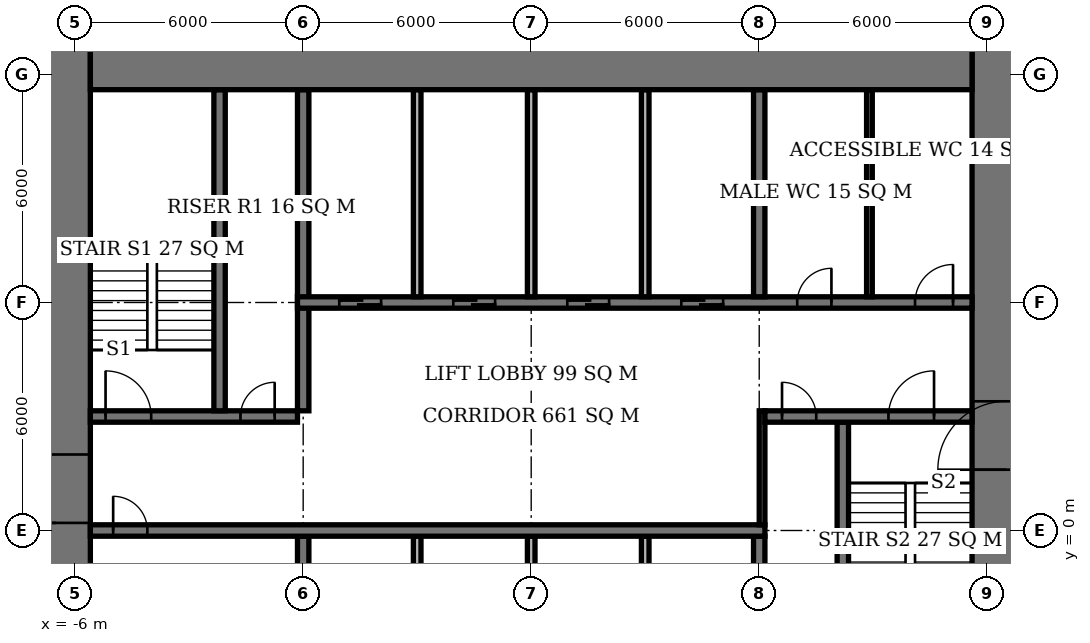
"""IFC4 building model, lengths in metres.
Left out: names, types, materials, properties, quantities, classifications, styles, units other than length and angle.
Written with IfcOpenShell. Run it as: python <this file> out.ifc"""

import sys

from ifc_helpers import new_model, si_unit, direction, frame, frame_2d, origin, place, context, subcontext, project, spatial, rectangle, extrude, element, fill, save


model = new_model("IFC4")
c1 = context("Model", 3, precision=1e-05, world=origin(), true_north=direction((0.0, 1.0)))
c2 = subcontext(c1, "Body", "Model", "MODEL_VIEW")
j1 = project(units=[si_unit("LENGTHUNIT", "METRE"), si_unit("PLANEANGLEUNIT", "RADIAN")], contexts=[c1])
p1 = place(None, origin())
s1 = spatial("IfcSite", under=j1, at=p1, CompositionType="ELEMENT")
p2 = place(p1, origin())
s2 = spatial("IfcBuilding", under=s1, at=p2, CompositionType="ELEMENT")
p3 = place(p2, frame((0.0, 0.0, 65.0)))
s3 = spatial("IfcBuildingStorey", under=s2, at=p3, CompositionType="ELEMENT", Elevation=65.0)
p4 = place(p3, frame((-5.6, 12.6, 0.0), z_axis=(0.0, 0.0, 1.0), x_axis=(1.0, 0.0, 0.0)))
e1 = element("IfcWall", 1, at=p4, inside=s3, PredefinedType="SHEAR", context=c2, shape_type="SweptSolid", body=[
    extrude(rectangle(XDim=23.2, YDim=2.0, at=frame_2d((11.6, 0.0))), origin(), (0.0, 0.0, 1.0), 3.9),
])
p5 = place(p3, frame((-6.5, -7.6, 0.0), z_axis=(0.0, 0.0, 1.0), x_axis=(0.0, 1.0, 0.0)))
e2 = element("IfcWall", 2, at=p5, inside=s3, PredefinedType="SHEAR", context=c2, shape_type="SweptSolid", body=[
    extrude(rectangle(XDim=21.2, YDim=1.8, at=frame_2d((10.6, 0.0))), origin(), (0.0, 0.0, 1.0), 3.9),
])
p6 = place(p5, frame((7.8, 0.0, 0.0)))
e3 = element("IfcOpeningElement", 3, at=p6, cuts=e2, PredefinedType="OPENING", context=c2, shape_type="SweptSolid", body=[
    extrude(rectangle(XDim=1.8, YDim=2.4, at=frame_2d((0.9, 1.2))), frame((0.0, 0.91, 0.0), z_axis=(0.0, -1.0, 0.0), x_axis=(1.0, 0.0, 0.0)), (0.0, 0.0, 1.0), 1.82),
])
p7 = place(p3, frame((18.5, -7.6, 0.0), z_axis=(0.0, 0.0, 1.0), x_axis=(0.0, 1.0, 0.0)))
e4 = element("IfcWall", 4, at=p7, inside=s3, PredefinedType="SHEAR", context=c2, shape_type="SweptSolid", body=[
    extrude(rectangle(XDim=21.2, YDim=1.8, at=frame_2d((10.6, 0.0))), origin(), (0.0, 0.0, 1.0), 3.9),
])
p8 = place(p7, frame((9.2, 0.0, 0.0)))
e5 = element("IfcOpeningElement", 5, at=p8, cuts=e4, PredefinedType="OPENING", context=c2, shape_type="SweptSolid", body=[
    extrude(rectangle(XDim=1.8, YDim=2.4, at=frame_2d((0.9, 1.2))), frame((0.0, 0.91, 0.0), z_axis=(0.0, -1.0, 0.0), x_axis=(1.0, 0.0, 0.0)), (0.0, 0.0, 1.0), 1.82),
])
p9 = place(p3, frame((-5.6, 0.0, 0.0), z_axis=(0.0, 0.0, 1.0), x_axis=(1.0, 0.0, 0.0)))
e6 = element("IfcWall", 6, at=p9, inside=s3, PredefinedType="SHEAR", context=c2, shape_type="SweptSolid", body=[
    extrude(rectangle(XDim=17.75, YDim=0.3, at=frame_2d((8.875, 0.0))), origin(), (0.0, 0.0, 1.0), 3.9),
])
p10 = place(p9, frame((0.6, 0.0, 0.0)))
e7 = element("IfcOpeningElement", 7, at=p10, cuts=e6, PredefinedType="OPENING", context=c2, shape_type="SweptSolid", body=[
    extrude(rectangle(XDim=0.9, YDim=2.1, at=frame_2d((0.45, 1.05))), frame((0.0, 0.16, 0.0), z_axis=(0.0, -1.0, 0.0), x_axis=(1.0, 0.0, 0.0)), (0.0, 0.0, 1.0), 0.32),
])
p11 = place(p3, frame((-5.6, 3.0, 0.0), z_axis=(0.0, 0.0, 1.0), x_axis=(1.0, 0.0, 0.0)))
e8 = element("IfcWall", 8, at=p11, inside=s3, PredefinedType="SHEAR", context=c2, shape_type="SweptSolid", body=[
    extrude(rectangle(XDim=5.45, YDim=0.3, at=frame_2d((2.725, 0.0))), origin(), (0.0, 0.0, 1.0), 3.9),
])
p12 = place(p11, frame((0.4, 0.0, 0.0)))
e9 = element("IfcOpeningElement", 9, at=p12, cuts=e8, PredefinedType="OPENING", context=c2, shape_type="SweptSolid", body=[
    extrude(rectangle(XDim=1.2, YDim=2.1, at=frame_2d((0.6, 1.05))), frame((0.0, 0.16, 0.0), z_axis=(0.0, -1.0, 0.0), x_axis=(1.0, 0.0, 0.0)), (0.0, 0.0, 1.0), 0.32),
])
p13 = place(p11, frame((3.95, 0.0, 0.0)))
e10 = element("IfcOpeningElement", 10, at=p13, cuts=e8, PredefinedType="OPENING", context=c2, shape_type="SweptSolid", body=[
    extrude(rectangle(XDim=0.9, YDim=2.1, at=frame_2d((0.45, 1.05))), frame((0.0, 0.16, 0.0), z_axis=(0.0, -1.0, 0.0), x_axis=(1.0, 0.0, 0.0)), (0.0, 0.0, 1.0), 0.32),
])
p14 = place(p3, frame((12.15, 3.0, 0.0), z_axis=(0.0, 0.0, 1.0), x_axis=(1.0, 0.0, 0.0)))
e11 = element("IfcWall", 11, at=p14, inside=s3, PredefinedType="SHEAR", context=c2, shape_type="SweptSolid", body=[
    extrude(rectangle(XDim=5.45, YDim=0.3, at=frame_2d((2.725, 0.0))), origin(), (0.0, 0.0, 1.0), 3.9),
])
p15 = place(p14, frame((3.25, 0.0, 0.0)))
e12 = element("IfcOpeningElement", 12, at=p15, cuts=e11, PredefinedType="OPENING", context=c2, shape_type="SweptSolid", body=[
    extrude(rectangle(XDim=1.2, YDim=2.1, at=frame_2d((0.6, 1.05))), frame((0.0, 0.16, 0.0), z_axis=(0.0, -1.0, 0.0), x_axis=(1.0, 0.0, 0.0)), (0.0, 0.0, 1.0), 0.32),
])
p16 = place(p14, frame((0.45, 0.0, 0.0)))
e13 = element("IfcOpeningElement", 13, at=p16, cuts=e11, PredefinedType="OPENING", context=c2, shape_type="SweptSolid", body=[
    extrude(rectangle(XDim=0.9, YDim=2.1, at=frame_2d((0.45, 1.05))), frame((0.0, 0.16, 0.0), z_axis=(0.0, -1.0, 0.0), x_axis=(1.0, 0.0, 0.0)), (0.0, 0.0, 1.0), 0.32),
])
p17 = place(p3, frame((-0.15, 6.0, 0.0), z_axis=(0.0, 0.0, 1.0), x_axis=(1.0, 0.0, 0.0)))
e14 = element("IfcWall", 14, at=p17, inside=s3, PredefinedType="SHEAR", context=c2, shape_type="SweptSolid", body=[
    extrude(rectangle(XDim=17.75, YDim=0.3, at=frame_2d((8.875, 0.0))), origin(), (0.0, 0.0, 1.0), 3.9),
])
p18 = place(p17, frame((13.15, 0.0, 0.0)))
e15 = element("IfcOpeningElement", 15, at=p18, cuts=e14, PredefinedType="OPENING", context=c2, shape_type="SweptSolid", body=[
    extrude(rectangle(XDim=0.9, YDim=2.1, at=frame_2d((0.45, 1.05))), frame((0.0, 0.16, 0.0), z_axis=(0.0, -1.0, 0.0), x_axis=(1.0, 0.0, 0.0)), (0.0, 0.0, 1.0), 0.32),
])
p19 = place(p17, frame((16.25, 0.0, 0.0)))
e16 = element("IfcOpeningElement", 16, at=p19, cuts=e14, PredefinedType="OPENING", context=c2, shape_type="SweptSolid", body=[
    extrude(rectangle(XDim=1.0, YDim=2.1, at=frame_2d((0.5, 1.05))), frame((0.0, 0.16, 0.0), z_axis=(0.0, -1.0, 0.0), x_axis=(1.0, 0.0, 0.0)), (0.0, 0.0, 1.0), 0.32),
])
p20 = place(p17, frame((1.1, 0.0, 0.0)))
e17 = element("IfcOpeningElement", 17, at=p20, cuts=e14, PredefinedType="OPENING", context=c2, shape_type="SweptSolid", body=[
    extrude(rectangle(XDim=1.1, YDim=2.1, at=frame_2d((0.55, 1.05))), frame((0.0, 0.16, 0.0), z_axis=(0.0, -1.0, 0.0), x_axis=(1.0, 0.0, 0.0)), (0.0, 0.0, 1.0), 0.32),
])
p21 = place(p17, frame((4.1, 0.0, 0.0)))
e18 = element("IfcOpeningElement", 18, at=p21, cuts=e14, PredefinedType="OPENING", context=c2, shape_type="SweptSolid", body=[
    extrude(rectangle(XDim=1.1, YDim=2.1, at=frame_2d((0.55, 1.05))), frame((0.0, 0.16, 0.0), z_axis=(0.0, -1.0, 0.0), x_axis=(1.0, 0.0, 0.0)), (0.0, 0.0, 1.0), 0.32),
])
p22 = place(p17, frame((7.1, 0.0, 0.0)))
e19 = element("IfcOpeningElement", 19, at=p22, cuts=e14, PredefinedType="OPENING", context=c2, shape_type="SweptSolid", body=[
    extrude(rectangle(XDim=1.1, YDim=2.1, at=frame_2d((0.55, 1.05))), frame((0.0, 0.16, 0.0), z_axis=(0.0, -1.0, 0.0), x_axis=(1.0, 0.0, 0.0)), (0.0, 0.0, 1.0), 0.32),
])
p23 = place(p17, frame((10.1, 0.0, 0.0)))
e20 = element("IfcOpeningElement", 20, at=p23, cuts=e14, PredefinedType="OPENING", context=c2, shape_type="SweptSolid", body=[
    extrude(rectangle(XDim=1.1, YDim=2.1, at=frame_2d((0.55, 1.05))), frame((0.0, 0.16, 0.0), z_axis=(0.0, -1.0, 0.0), x_axis=(1.0, 0.0, 0.0)), (0.0, 0.0, 1.0), 0.32),
])
p24 = place(p3, frame((0.0, -5.6, 0.0), z_axis=(0.0, 0.0, 1.0), x_axis=(0.0, 1.0, 0.0)))
e21 = element("IfcWall", 21, at=p24, inside=s3, PredefinedType="SHEAR", context=c2, shape_type="SweptSolid", body=[
    extrude(rectangle(XDim=5.45, YDim=0.3, at=frame_2d((2.725, 0.0))), origin(), (0.0, 0.0, 1.0), 3.9),
])
p25 = place(p3, frame((0.0, 3.15, 0.0), z_axis=(0.0, 0.0, 1.0), x_axis=(0.0, 1.0, 0.0)))
e22 = element("IfcWall", 22, at=p25, inside=s3, PredefinedType="SHEAR", context=c2, shape_type="SweptSolid", body=[
    extrude(rectangle(XDim=8.45, YDim=0.3, at=frame_2d((4.225, 0.0))), origin(), (0.0, 0.0, 1.0), 3.9),
])
for number, where, z_axis, x_axis in (
    (23, (12.0, -5.6, 0.0), (0.0, 0.0, 1.0), (0.0, 1.0, 0.0)),
    (24, (12.0, 6.15, 0.0), (0.0, 0.0, 1.0), (0.0, 1.0, 0.0)),
):
    element("IfcWall", number, at=place(p3, frame(where, z_axis=z_axis, x_axis=x_axis)), inside=s3, PredefinedType="SHEAR", context=c2, shape_type="SweptSolid", body=[
        extrude(rectangle(XDim=5.45, YDim=0.3, at=frame_2d((2.725, 0.0))), origin(), (0.0, 0.0, 1.0), 3.9),
    ])
for number, where, z_axis, x_axis in (
    (25, (-2.2, 3.15, 0.0), (0.0, 0.0, 1.0), (0.0, 1.0, 0.0)),
    (26, (14.2, -5.6, 0.0), (0.0, 0.0, 1.0), (0.0, 1.0, 0.0)),
):
    element("IfcWall", number, at=place(p3, frame(where, z_axis=z_axis, x_axis=x_axis)), inside=s3, PredefinedType="SHEAR", context=c2, shape_type="SweptSolid", body=[
        extrude(rectangle(XDim=8.45, YDim=0.3, at=frame_2d((4.225, 0.0))), origin(), (0.0, 0.0, 1.0), 3.9),
    ])
for number, where, z_axis, x_axis in (
    (27, (3.0, 6.15, 0.0), (0.0, 0.0, 1.0), (0.0, 1.0, 0.0)),
    (28, (6.0, 6.15, 0.0), (0.0, 0.0, 1.0), (0.0, 1.0, 0.0)),
    (29, (9.0, 6.15, 0.0), (0.0, 0.0, 1.0), (0.0, 1.0, 0.0)),
    (30, (3.0, -5.6, 0.0), (0.0, 0.0, 1.0), (0.0, 1.0, 0.0)),
    (31, (6.0, -5.6, 0.0), (0.0, 0.0, 1.0), (0.0, 1.0, 0.0)),
    (32, (9.0, -5.6, 0.0), (0.0, 0.0, 1.0), (0.0, 1.0, 0.0)),
):
    element("IfcWall", number, at=place(p3, frame(where, z_axis=z_axis, x_axis=x_axis)), inside=s3, PredefinedType="SOLIDWALL", context=c2, shape_type="SweptSolid", body=[
        extrude(rectangle(XDim=5.45, YDim=0.2, at=frame_2d((2.725, 0.0))), origin(), (0.0, 0.0, 1.0), 3.9),
    ])
p26 = place(p3, frame((14.9, 6.15, 0.0), z_axis=(0.0, 0.0, 1.0), x_axis=(0.0, 1.0, 0.0)))
e33 = element("IfcWall", 33, at=p26, inside=s3, PredefinedType="PLUMBINGWALL", context=c2, shape_type="SweptSolid", body=[
    extrude(rectangle(XDim=5.45, YDim=0.15, at=frame_2d((2.725, 0.0))), origin(), (0.0, 0.0, 1.0), 3.65),
])
p27 = place(p3, frame((12.075, 0.15, 0.0), z_axis=(0.0, 0.0, 1.0), x_axis=(0.0, 1.0, 0.0)))
e34 = element("IfcWall", 34, at=p27, inside=s3, PredefinedType="PARTITIONING", context=c2, shape_type="SweptSolid", body=[
    extrude(rectangle(XDim=3.0, YDim=0.15, at=frame_2d((1.5, 0.0))), origin(), (0.0, 0.0, 1.0), 3.65),
])
p28 = place(p6, origin())
e35 = element("IfcDoor", 35, at=p28, inside=s3, OperationType="DOUBLE_DOOR_SINGLE_SWING", PredefinedType="DOOR", context=c2, shape_type="SweptSolid", body=[
    extrude(rectangle(XDim=1.8, YDim=2.4, at=frame_2d((0.9, 1.2))), frame((0.0, 0.025, 0.0), z_axis=(0.0, -1.0, 0.0), x_axis=(1.0, 0.0, 0.0)), (0.0, 0.0, 1.0), 0.05),
])
fill(e3, e35)
p29 = place(p8, origin())
e36 = element("IfcDoor", 36, at=p29, inside=s3, OperationType="DOUBLE_DOOR_SINGLE_SWING", PredefinedType="DOOR", context=c2, shape_type="SweptSolid", body=[
    extrude(rectangle(XDim=1.8, YDim=2.4, at=frame_2d((0.9, 1.2))), frame((0.0, 0.025, 0.0), z_axis=(0.0, -1.0, 0.0), x_axis=(1.0, 0.0, 0.0)), (0.0, 0.0, 1.0), 0.05),
])
fill(e5, e36)
p30 = place(p12, origin())
e37 = element("IfcDoor", 37, at=p30, inside=s3, OperationType="SINGLE_SWING_LEFT", PredefinedType="DOOR", context=c2, shape_type="SweptSolid", body=[
    extrude(rectangle(XDim=1.2, YDim=2.1, at=frame_2d((0.6, 1.05))), frame((0.0, 0.025, 0.0), z_axis=(0.0, -1.0, 0.0), x_axis=(1.0, 0.0, 0.0)), (0.0, 0.0, 1.0), 0.05),
])
fill(e9, e37)
p31 = place(p13, origin())
e38 = element("IfcDoor", 38, at=p31, inside=s3, OperationType="SINGLE_SWING_RIGHT", PredefinedType="DOOR", context=c2, shape_type="SweptSolid", body=[
    extrude(rectangle(XDim=0.9, YDim=2.1, at=frame_2d((0.45, 1.05))), frame((0.0, 0.025, 0.0), z_axis=(0.0, -1.0, 0.0), x_axis=(1.0, 0.0, 0.0)), (0.0, 0.0, 1.0), 0.05),
])
fill(e10, e38)
p32 = place(p15, origin())
e39 = element("IfcDoor", 39, at=p32, inside=s3, OperationType="SINGLE_SWING_RIGHT", PredefinedType="DOOR", context=c2, shape_type="SweptSolid", body=[
    extrude(rectangle(XDim=1.2, YDim=2.1, at=frame_2d((0.6, 1.05))), frame((0.0, 0.025, 0.0), z_axis=(0.0, -1.0, 0.0), x_axis=(1.0, 0.0, 0.0)), (0.0, 0.0, 1.0), 0.05),
])
fill(e12, e39)
p33 = place(p16, origin())
e40 = element("IfcDoor", 40, at=p33, inside=s3, OperationType="SINGLE_SWING_LEFT", PredefinedType="DOOR", context=c2, shape_type="SweptSolid", body=[
    extrude(rectangle(XDim=0.9, YDim=2.1, at=frame_2d((0.45, 1.05))), frame((0.0, 0.025, 0.0), z_axis=(0.0, -1.0, 0.0), x_axis=(1.0, 0.0, 0.0)), (0.0, 0.0, 1.0), 0.05),
])
fill(e13, e40)
p34 = place(p10, origin())
e41 = element("IfcDoor", 41, at=p34, inside=s3, OperationType="SINGLE_SWING_LEFT", PredefinedType="DOOR", context=c2, shape_type="SweptSolid", body=[
    extrude(rectangle(XDim=0.9, YDim=2.1, at=frame_2d((0.45, 1.05))), frame((0.0, 0.025, 0.0), z_axis=(0.0, -1.0, 0.0), x_axis=(1.0, 0.0, 0.0)), (0.0, 0.0, 1.0), 0.05),
])
fill(e7, e41)
p35 = place(p18, origin())
e42 = element("IfcDoor", 42, at=p35, inside=s3, OperationType="SINGLE_SWING_RIGHT", PredefinedType="DOOR", context=c2, shape_type="SweptSolid", body=[
    extrude(rectangle(XDim=0.9, YDim=2.1, at=frame_2d((0.45, 1.05))), frame((0.0, 0.025, 0.0), z_axis=(0.0, -1.0, 0.0), x_axis=(1.0, 0.0, 0.0)), (0.0, 0.0, 1.0), 0.05),
])
fill(e15, e42)
p36 = place(p19, origin())
e43 = element("IfcDoor", 43, at=p36, inside=s3, OperationType="SINGLE_SWING_RIGHT", PredefinedType="DOOR", context=c2, shape_type="SweptSolid", body=[
    extrude(rectangle(XDim=1.0, YDim=2.1, at=frame_2d((0.5, 1.05))), frame((0.0, 0.025, 0.0), z_axis=(0.0, -1.0, 0.0), x_axis=(1.0, 0.0, 0.0)), (0.0, 0.0, 1.0), 0.05),
])
fill(e16, e43)
p37 = place(p20, origin())
e44 = element("IfcDoor", 44, at=p37, inside=s3, OperationType="DOUBLE_DOOR_SLIDING", PredefinedType="USERDEFINED", context=c2, shape_type="SweptSolid", body=[
    extrude(rectangle(XDim=1.1, YDim=2.1, at=frame_2d((0.55, 1.05))), frame((0.0, 0.025, 0.0), z_axis=(0.0, -1.0, 0.0), x_axis=(1.0, 0.0, 0.0)), (0.0, 0.0, 1.0), 0.05),
])
fill(e17, e44)
p38 = place(p21, origin())
e45 = element("IfcDoor", 45, at=p38, inside=s3, OperationType="DOUBLE_DOOR_SLIDING", PredefinedType="USERDEFINED", context=c2, shape_type="SweptSolid", body=[
    extrude(rectangle(XDim=1.1, YDim=2.1, at=frame_2d((0.55, 1.05))), frame((0.0, 0.025, 0.0), z_axis=(0.0, -1.0, 0.0), x_axis=(1.0, 0.0, 0.0)), (0.0, 0.0, 1.0), 0.05),
])
fill(e18, e45)
p39 = place(p22, origin())
e46 = element("IfcDoor", 46, at=p39, inside=s3, OperationType="DOUBLE_DOOR_SLIDING", PredefinedType="USERDEFINED", context=c2, shape_type="SweptSolid", body=[
    extrude(rectangle(XDim=1.1, YDim=2.1, at=frame_2d((0.55, 1.05))), frame((0.0, 0.025, 0.0), z_axis=(0.0, -1.0, 0.0), x_axis=(1.0, 0.0, 0.0)), (0.0, 0.0, 1.0), 0.05),
])
fill(e19, e46)
p40 = place(p23, origin())
e47 = element("IfcDoor", 47, at=p40, inside=s3, OperationType="DOUBLE_DOOR_SLIDING", PredefinedType="USERDEFINED", context=c2, shape_type="SweptSolid", body=[
    extrude(rectangle(XDim=1.1, YDim=2.1, at=frame_2d((0.55, 1.05))), frame((0.0, 0.025, 0.0), z_axis=(0.0, -1.0, 0.0), x_axis=(1.0, 0.0, 0.0)), (0.0, 0.0, 1.0), 0.05),
])
fill(e20, e47)
save(model, sys.argv[1])
